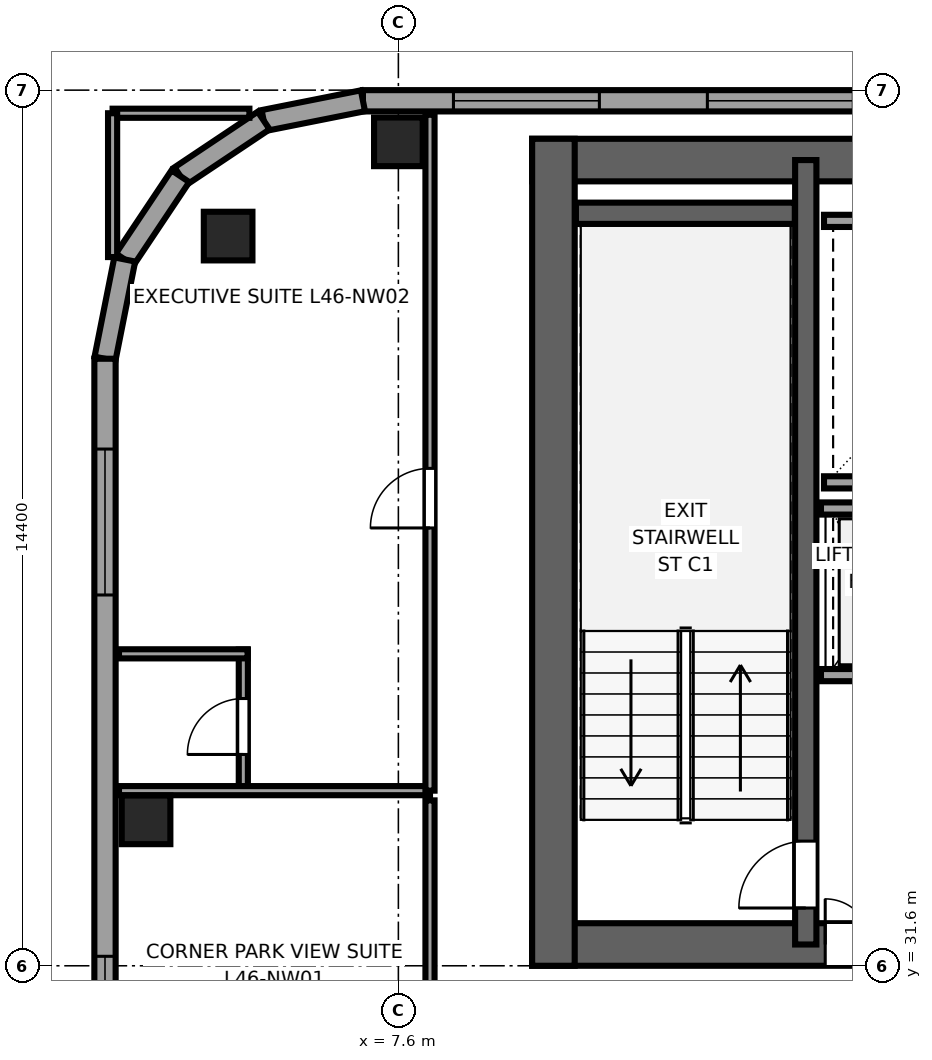
"""IFC4 building model, lengths in metres.
Left out: names, types, materials, properties, quantities, classifications, styles, units other than length and angle.
Written with IfcOpenShell. Run it as: python <this file> out.ifc"""

import sys

from ifc_helpers import new_model, si_unit, direction, frame, frame_2d, origin, origin_2d, place, context, subcontext, project, spatial, rectangle, extrude, source, transform, mapped, element, fill, save


model = new_model("IFC4")
c1 = context("Model", 3, precision=1e-05, world=origin(), true_north=direction((0.0, 1.0)))
c2 = subcontext(c1, "Body", "Model", "MODEL_VIEW")
j1 = project(units=[si_unit("LENGTHUNIT", "METRE"), si_unit("PLANEANGLEUNIT", "RADIAN")], contexts=[c1])
p1 = place(None, origin())
s1 = spatial("IfcSite", under=j1, at=p1, CompositionType="ELEMENT")
p2 = place(p1, origin())
s2 = spatial("IfcBuilding", under=s1, at=p2, CompositionType="ELEMENT")
p3 = place(p2, frame((0.0, 0.0, 175.45)))
s3 = spatial("IfcBuildingStorey", under=s2, at=p3, CompositionType="ELEMENT", Elevation=175.45)
p4 = place(p3, frame((9.8, 31.95, 0.0), z_axis=(0.0, 0.0, 1.0), x_axis=(1.0, 0.0, 0.0)))
e1 = element("IfcWall", 1, at=p4, inside=s3, PredefinedType="SHEAR", context=c2, shape_type="SweptSolid", body=[
    extrude(rectangle(XDim=26.4, YDim=0.7, at=frame_2d((13.2, 0.0))), origin(), (0.0, 0.0, 1.0), 3.55),
])
p5 = place(p4, frame((6.32, 0.0, 0.0), z_axis=(0.0, 0.0, 1.0), x_axis=(-1.0, 0.0, 0.0)))
e2 = element("IfcOpeningElement", 2, at=p5, cuts=e1, PredefinedType="OPENING", context=c2, shape_type="SweptSolid", body=[
    extrude(rectangle(XDim=1.5, YDim=2.04, at=frame_2d((0.75, 1.02))), frame((0.0, 0.36, 0.0), z_axis=(0.0, -1.0, 0.0), x_axis=(1.0, 0.0, 0.0)), (0.0, 0.0, 1.0), 0.72),
])
p6 = place(p4, frame((13.95, 0.0, 0.0), z_axis=(0.0, 0.0, 1.0), x_axis=(-1.0, 0.0, 0.0)))
e3 = element("IfcOpeningElement", 3, at=p6, cuts=e1, PredefinedType="OPENING", context=c2, shape_type="SweptSolid", body=[
    extrude(rectangle(XDim=1.5, YDim=2.04, at=frame_2d((0.75, 1.02))), frame((0.0, 0.36, 0.0), z_axis=(0.0, -1.0, 0.0), x_axis=(1.0, 0.0, 0.0)), (0.0, 0.0, 1.0), 0.72),
])
p7 = place(p4, frame((20.25, 0.0, 0.0), z_axis=(0.0, 0.0, 1.0), x_axis=(-1.0, 0.0, 0.0)))
e4 = element("IfcOpeningElement", 4, at=p7, cuts=e1, PredefinedType="OPENING", context=c2, shape_type="SweptSolid", body=[
    extrude(rectangle(XDim=1.5, YDim=2.04, at=frame_2d((0.75, 1.02))), frame((0.0, 0.36, 0.0), z_axis=(0.0, -1.0, 0.0), x_axis=(1.0, 0.0, 0.0)), (0.0, 0.0, 1.0), 0.72),
])
p8 = place(p4, frame((8.37, 0.0, 0.0), z_axis=(0.0, 0.0, 1.0), x_axis=(-1.0, 0.0, 0.0)))
e5 = element("IfcOpeningElement", 5, at=p8, cuts=e1, PredefinedType="OPENING", context=c2, shape_type="SweptSolid", body=[
    extrude(rectangle(XDim=0.82, YDim=2.01, at=frame_2d((0.41, 1.005))), frame((0.0, 0.36, 0.0), z_axis=(0.0, -1.0, 0.0), x_axis=(1.0, 0.0, 0.0)), (0.0, 0.0, 1.0), 0.72),
])
p9 = place(p3, frame((9.8, 44.85, 0.0), z_axis=(0.0, 0.0, 1.0), x_axis=(1.0, 0.0, 0.0)))
e6 = element("IfcWall", 6, at=p9, inside=s3, PredefinedType="SHEAR", context=c2, shape_type="SweptSolid", body=[
    extrude(rectangle(XDim=26.4, YDim=0.7, at=frame_2d((13.2, 0.0))), origin(), (0.0, 0.0, 1.0), 3.55),
])
p10 = place(p3, frame((10.15, 31.6, 0.0), z_axis=(0.0, 0.0, 1.0), x_axis=(0.0, 1.0, 0.0)))
e7 = element("IfcWall", 7, at=p10, inside=s3, PredefinedType="SHEAR", context=c2, shape_type="SweptSolid", body=[
    extrude(rectangle(XDim=13.6, YDim=0.7, at=frame_2d((6.8, 0.0))), origin(), (0.0, 0.0, 1.0), 3.55),
])
p11 = place(p3, frame((14.3, 31.95, 0.0), z_axis=(0.0, 0.0, 1.0), x_axis=(0.0, 1.0, 0.0)))
e8 = element("IfcWall", 8, at=p11, inside=s3, PredefinedType="SHEAR", context=c2, shape_type="SweptSolid", body=[
    extrude(rectangle(XDim=12.9, YDim=0.35, at=frame_2d((6.45, 0.0))), origin(), (0.0, 0.0, 1.0), 3.55),
])
p12 = place(p11, frame((0.6, 0.0, 0.0)))
e9 = element("IfcOpeningElement", 9, at=p12, cuts=e8, PredefinedType="OPENING", context=c2, shape_type="SweptSolid", body=[
    extrude(rectangle(XDim=1.1, YDim=2.12, at=frame_2d((0.55, 1.06))), frame((0.0, 0.185, 0.0), z_axis=(0.0, -1.0, 0.0), x_axis=(1.0, 0.0, 0.0)), (0.0, 0.0, 1.0), 0.37),
])
p13 = place(p3, frame((10.52, 43.975, 0.0), z_axis=(0.0, 0.0, 1.0), x_axis=(1.0, 0.0, 0.0)))
e10 = element("IfcWall", 10, at=p13, inside=s3, PredefinedType="SHEAR", context=c2, shape_type="SweptSolid", body=[
    extrude(rectangle(XDim=3.6, YDim=0.35, at=frame_2d((1.8, 0.0))), origin(), (0.0, 0.0, 1.0), 3.55),
])
m1 = source(origin(), c2, "Body", "SweptSolid", [
    extrude(rectangle(XDim=0.8, YDim=0.8, at=origin_2d()), origin(), (0.0, 0.0, 1.0), 3.55),
])
for number, where, z_axis, x_axis in (
    (11, (4.8, 43.6, 0.0), (0.0, 0.0, 1.0), (1.0, 0.0, 0.0)),
    (12, (7.6, 45.15, 0.0), (0.0, 0.0, 1.0), (1.0, 0.0, 0.0)),
    (13, (3.45, 34.0, 0.0), (0.0, 0.0, 1.0), (1.0, 0.0, 0.0)),
):
    element("IfcColumn", number, at=place(p3, frame(where, z_axis=z_axis, x_axis=x_axis)), inside=s3, PredefinedType="COLUMN", context=c2, shape_type="MappedRepresentation", body=[
        mapped(m1, transform((0.0, 0.0, 0.0), x_axis=(1.0, 0.0, 0.0), y_axis=(0.0, 1.0, 0.0), z_axis=(0.0, 0.0, 1.0), scale=1.0)),
    ])
p14 = place(p3, frame((49.983, 45.825, 0.0), z_axis=(0.0, 0.0, 1.0), x_axis=(-1.0, 0.0, 0.0)))
e14 = element("IfcWall", 14, at=p14, inside=s3, PredefinedType="SOLIDWALL", context=c2, shape_type="SweptSolid", body=[
    extrude(rectangle(XDim=42.966, YDim=0.35, at=frame_2d((21.483, 0.0))), origin(), (0.0, 0.0, 1.0), 3.37),
])
p15 = place(p14, frame((1.488, 0.0, 0.68)))
e15 = element("IfcOpeningElement", 15, at=p15, cuts=e14, PredefinedType="OPENING", context=c2, shape_type="SweptSolid", body=[
    extrude(rectangle(XDim=2.4, YDim=1.9, at=frame_2d((1.2, 0.95))), frame((0.0, 0.185, 0.0), z_axis=(0.0, -1.0, 0.0), x_axis=(1.0, 0.0, 0.0)), (0.0, 0.0, 1.0), 0.37),
])
p16 = place(p14, frame((9.841, 0.0, 0.68)))
e16 = element("IfcOpeningElement", 16, at=p16, cuts=e14, PredefinedType="OPENING", context=c2, shape_type="SweptSolid", body=[
    extrude(rectangle(XDim=2.4, YDim=1.9, at=frame_2d((1.2, 0.95))), frame((0.0, 0.185, 0.0), z_axis=(0.0, -1.0, 0.0), x_axis=(1.0, 0.0, 0.0)), (0.0, 0.0, 1.0), 0.37),
])
p17 = place(p14, frame((14.018, 0.0, 0.68)))
e17 = element("IfcOpeningElement", 17, at=p17, cuts=e14, PredefinedType="OPENING", context=c2, shape_type="SweptSolid", body=[
    extrude(rectangle(XDim=2.4, YDim=1.9, at=frame_2d((1.2, 0.95))), frame((0.0, 0.185, 0.0), z_axis=(0.0, -1.0, 0.0), x_axis=(1.0, 0.0, 0.0)), (0.0, 0.0, 1.0), 0.37),
])
p18 = place(p14, frame((18.195, 0.0, 0.68)))
e18 = element("IfcOpeningElement", 18, at=p18, cuts=e14, PredefinedType="OPENING", context=c2, shape_type="SweptSolid", body=[
    extrude(rectangle(XDim=2.4, YDim=1.9, at=frame_2d((1.2, 0.95))), frame((0.0, 0.185, 0.0), z_axis=(0.0, -1.0, 0.0), x_axis=(1.0, 0.0, 0.0)), (0.0, 0.0, 1.0), 0.37),
])
p19 = place(p14, frame((22.371, 0.0, 0.68)))
e19 = element("IfcOpeningElement", 19, at=p19, cuts=e14, PredefinedType="OPENING", context=c2, shape_type="SweptSolid", body=[
    extrude(rectangle(XDim=2.4, YDim=1.9, at=frame_2d((1.2, 0.95))), frame((0.0, 0.185, 0.0), z_axis=(0.0, -1.0, 0.0), x_axis=(1.0, 0.0, 0.0)), (0.0, 0.0, 1.0), 0.37),
])
p20 = place(p14, frame((26.548, 0.0, 0.68)))
e20 = element("IfcOpeningElement", 20, at=p20, cuts=e14, PredefinedType="OPENING", context=c2, shape_type="SweptSolid", body=[
    extrude(rectangle(XDim=2.4, YDim=1.9, at=frame_2d((1.2, 0.95))), frame((0.0, 0.185, 0.0), z_axis=(0.0, -1.0, 0.0), x_axis=(1.0, 0.0, 0.0)), (0.0, 0.0, 1.0), 0.37),
])
p21 = place(p14, frame((30.724, 0.0, 0.68)))
e21 = element("IfcOpeningElement", 21, at=p21, cuts=e14, PredefinedType="OPENING", context=c2, shape_type="SweptSolid", body=[
    extrude(rectangle(XDim=2.4, YDim=1.9, at=frame_2d((1.2, 0.95))), frame((0.0, 0.185, 0.0), z_axis=(0.0, -1.0, 0.0), x_axis=(1.0, 0.0, 0.0)), (0.0, 0.0, 1.0), 0.37),
])
p22 = place(p14, frame((34.901, 0.0, 0.68)))
e22 = element("IfcOpeningElement", 22, at=p22, cuts=e14, PredefinedType="OPENING", context=c2, shape_type="SweptSolid", body=[
    extrude(rectangle(XDim=2.4, YDim=1.9, at=frame_2d((1.2, 0.95))), frame((0.0, 0.185, 0.0), z_axis=(0.0, -1.0, 0.0), x_axis=(1.0, 0.0, 0.0)), (0.0, 0.0, 1.0), 0.37),
])
p23 = place(p14, frame((39.077, 0.0, 0.68)))
e23 = element("IfcOpeningElement", 23, at=p23, cuts=e14, PredefinedType="OPENING", context=c2, shape_type="SweptSolid", body=[
    extrude(rectangle(XDim=2.4, YDim=1.9, at=frame_2d((1.2, 0.95))), frame((0.0, 0.185, 0.0), z_axis=(0.0, -1.0, 0.0), x_axis=(1.0, 0.0, 0.0)), (0.0, 0.0, 1.0), 0.37),
])
p24 = place(p3, frame((7.017, 45.825, 0.0), z_axis=(0.0, 0.0, 1.0), x_axis=(-0.980788844421, -0.195072403631, 0.0)))
e24 = element("IfcWall", 24, at=p24, inside=s3, PredefinedType="SOLIDWALL", context=c2, shape_type="SweptSolid", body=[
    extrude(rectangle(XDim=1.665, YDim=0.35, at=frame_2d((0.832, 0.0))), origin(), (0.0, 0.0, 1.0), 3.37),
])
for number, where, z_axis, x_axis in (
    (25, (5.385, 45.5, 0.0), (0.0, 0.0, 1.0), (-0.832, -0.556, 0.0)),
    (26, (4.015, 44.585, 0.0), (0.0, 0.0, 1.0), (-0.556, -0.831, 0.0)),
):
    element("IfcWall", number, at=place(p3, frame(where, z_axis=z_axis, x_axis=x_axis)), inside=s3, PredefinedType="SOLIDWALL", context=c2, shape_type="SweptSolid", body=[
        extrude(rectangle(XDim=1.647, YDim=0.35, at=frame_2d((0.824, 0.0))), origin(), (0.0, 0.0, 1.0), 2.832),
    ])
p25 = place(p3, frame((3.1, 43.216, 0.0), z_axis=(0.0, 0.0, 1.0), x_axis=(-0.195044345786, -0.980794424524, 0.0)))
e27 = element("IfcWall", 27, at=p25, inside=s3, PredefinedType="SOLIDWALL", context=c2, shape_type="SweptSolid", body=[
    extrude(rectangle(XDim=1.665, YDim=0.35, at=frame_2d((0.833, 0.0))), origin(), (0.0, 0.0, 1.0), 3.37),
])
p26 = place(p3, frame((2.775, 41.583, 0.0), z_axis=(0.0, 0.0, 1.0), x_axis=(0.0, -1.0, 0.0)))
e28 = element("IfcWall", 28, at=p26, inside=s3, PredefinedType="SOLIDWALL", context=c2, shape_type="SweptSolid", body=[
    extrude(rectangle(XDim=34.566, YDim=0.35, at=frame_2d((17.283, 0.0))), origin(), (0.0, 0.0, 1.0), 3.37),
])
p27 = place(p26, frame((1.485, 0.0, 0.68)))
e29 = element("IfcOpeningElement", 29, at=p27, cuts=e28, PredefinedType="OPENING", context=c2, shape_type="SweptSolid", body=[
    extrude(rectangle(XDim=2.4, YDim=1.9, at=frame_2d((1.2, 0.95))), frame((0.0, 0.185, 0.0), z_axis=(0.0, -1.0, 0.0), x_axis=(1.0, 0.0, 0.0)), (0.0, 0.0, 1.0), 0.37),
])
p28 = place(p26, frame((9.827, 0.0, 0.68)))
e30 = element("IfcOpeningElement", 30, at=p28, cuts=e28, PredefinedType="OPENING", context=c2, shape_type="SweptSolid", body=[
    extrude(rectangle(XDim=2.4, YDim=1.9, at=frame_2d((1.2, 0.95))), frame((0.0, 0.185, 0.0), z_axis=(0.0, -1.0, 0.0), x_axis=(1.0, 0.0, 0.0)), (0.0, 0.0, 1.0), 0.37),
])
p29 = place(p26, frame((13.997, 0.0, 0.68)))
e31 = element("IfcOpeningElement", 31, at=p29, cuts=e28, PredefinedType="OPENING", context=c2, shape_type="SweptSolid", body=[
    extrude(rectangle(XDim=2.4, YDim=1.9, at=frame_2d((1.2, 0.95))), frame((0.0, 0.185, 0.0), z_axis=(0.0, -1.0, 0.0), x_axis=(1.0, 0.0, 0.0)), (0.0, 0.0, 1.0), 0.37),
])
p30 = place(p26, frame((30.13, 0.0, 0.68)))
e32 = element("IfcOpeningElement", 32, at=p30, cuts=e28, PredefinedType="OPENING", context=c2, shape_type="SweptSolid", body=[
    extrude(rectangle(XDim=2.4, YDim=1.9, at=frame_2d((1.2, 0.95))), frame((0.0, 0.185, 0.0), z_axis=(0.0, -1.0, 0.0), x_axis=(1.0, 0.0, 0.0)), (0.0, 0.0, 1.0), 0.37),
])
p31 = place(p26, frame((24.983, 0.0, 0.62)))
e33 = element("IfcOpeningElement", 33, at=p31, cuts=e28, PredefinedType="OPENING", context=c2, shape_type="SweptSolid", body=[
    extrude(rectangle(XDim=1.5, YDim=1.55, at=frame_2d((0.75, 0.775))), frame((0.0, 0.185, 0.0), z_axis=(0.0, -1.0, 0.0), x_axis=(1.0, 0.0, 0.0)), (0.0, 0.0, 1.0), 0.37),
])
for number, where, z_axis, x_axis in (
    (34, (14.6, 39.55, 0.0), (0.0, 0.0, 1.0), (1.0, 0.0, 0.0)),
    (35, (14.6, 43.85, 0.0), (0.0, 0.0, 1.0), (1.0, 0.0, 0.0)),
):
    element("IfcWall", number, at=place(p3, frame(where, z_axis=z_axis, x_axis=x_axis)), inside=s3, PredefinedType="SOLIDWALL", context=c2, shape_type="SweptSolid", body=[
        extrude(rectangle(XDim=4.1, YDim=0.2, at=frame_2d((2.05, 0.0))), origin(), (0.0, 0.0, 1.0), 3.37),
    ])
p32 = place(p3, frame((14.55, 36.38, 0.0), z_axis=(0.0, 0.0, 1.0), x_axis=(1.0, 0.0, 0.0)))
e36 = element("IfcWall", 36, at=p32, inside=s3, PredefinedType="SOLIDWALL", context=c2, shape_type="SweptSolid", body=[
    extrude(rectangle(XDim=4.075, YDim=0.2, at=frame_2d((2.038, 0.0))), origin(), (0.0, 0.0, 1.0), 3.37),
])
p33 = place(p32, frame((0.55, 0.0, 0.0)))
e37 = element("IfcOpeningElement", 37, at=p33, cuts=e36, PredefinedType="OPENING", context=c2, shape_type="SweptSolid", body=[
    extrude(rectangle(XDim=1.1, YDim=2.12, at=frame_2d((0.55, 1.06))), frame((0.0, 0.11, 0.0), z_axis=(0.0, -1.0, 0.0), x_axis=(1.0, 0.0, 0.0)), (0.0, 0.0, 1.0), 0.22),
])
p34 = place(p32, frame((2.45, 0.0, 0.0)))
e38 = element("IfcOpeningElement", 38, at=p34, cuts=e36, PredefinedType="OPENING", context=c2, shape_type="SweptSolid", body=[
    extrude(rectangle(XDim=1.1, YDim=2.12, at=frame_2d((0.55, 1.06))), frame((0.0, 0.11, 0.0), z_axis=(0.0, -1.0, 0.0), x_axis=(1.0, 0.0, 0.0)), (0.0, 0.0, 1.0), 0.22),
])
p35 = place(p3, frame((14.55, 39.12, 0.0), z_axis=(0.0, 0.0, 1.0), x_axis=(1.0, 0.0, 0.0)))
e39 = element("IfcWall", 39, at=p35, inside=s3, PredefinedType="SOLIDWALL", context=c2, shape_type="SweptSolid", body=[
    extrude(rectangle(XDim=4.075, YDim=0.2, at=frame_2d((2.038, 0.0))), origin(), (0.0, 0.0, 1.0), 3.37),
])
p36 = place(p3, frame((5.05, 34.41, 0.0), z_axis=(0.0, 0.0, 1.0), x_axis=(0.0, 1.0, 0.0)))
e40 = element("IfcWall", 40, at=p36, inside=s3, PredefinedType="PARTITIONING", context=c2, shape_type="SweptSolid", body=[
    extrude(rectangle(XDim=2.39, YDim=0.15, at=frame_2d((1.195, 0.0))), origin(), (0.0, 0.0, 1.0), 3.37),
])
p37 = place(p36, frame((0.665, 0.0, 0.0)))
e41 = element("IfcOpeningElement", 41, at=p37, cuts=e40, PredefinedType="OPENING", context=c2, shape_type="SweptSolid", body=[
    extrude(rectangle(XDim=0.92, YDim=2.01, at=frame_2d((0.46, 1.005))), frame((0.0, 0.085, 0.0), z_axis=(0.0, -1.0, 0.0), x_axis=(1.0, 0.0, 0.0)), (0.0, 0.0, 1.0), 0.17),
])
p38 = place(p3, frame((3.005, 34.48, 0.0), z_axis=(0.0, 0.0, 1.0), x_axis=(1.0, 0.0, 0.0)))
e42 = element("IfcWall", 42, at=p38, inside=s3, PredefinedType="PARTITIONING", context=c2, shape_type="SweptSolid", body=[
    extrude(rectangle(XDim=5.115, YDim=0.15, at=frame_2d((2.558, 0.0))), origin(), (0.0, 0.0, 1.0), 3.37),
])
p39 = place(p3, frame((3.005, 36.73, 0.0), z_axis=(0.0, 0.0, 1.0), x_axis=(1.0, 0.0, 0.0)))
e43 = element("IfcWall", 43, at=p39, inside=s3, PredefinedType="PARTITIONING", context=c2, shape_type="SweptSolid", body=[
    extrude(rectangle(XDim=2.115, YDim=0.15, at=frame_2d((1.058, 0.0))), origin(), (0.0, 0.0, 1.0), 3.37),
])
p40 = place(p3, frame((8.12, 20.78, 0.0), z_axis=(0.0, 0.0, 1.0), x_axis=(0.0, 1.0, 0.0)))
e44 = element("IfcWall", 44, at=p40, inside=s3, PredefinedType="PARTITIONING", context=c2, shape_type="SweptSolid", body=[
    extrude(rectangle(XDim=13.54, YDim=0.15, at=frame_2d((6.77, 0.0))), origin(), (0.0, 0.0, 1.0), 3.37),
])
p41 = place(p40, frame((6.28, 0.0, 0.0)))
e45 = element("IfcOpeningElement", 45, at=p41, cuts=e44, PredefinedType="OPENING", context=c2, shape_type="SweptSolid", body=[
    extrude(rectangle(XDim=0.98, YDim=2.12, at=frame_2d((0.49, 1.06))), frame((0.0, 0.085, 0.0), z_axis=(0.0, -1.0, 0.0), x_axis=(1.0, 0.0, 0.0)), (0.0, 0.0, 1.0), 0.17),
])
p42 = place(p3, frame((8.12, 34.48, 0.0), z_axis=(0.0, 0.0, 1.0), x_axis=(0.0, 1.0, 0.0)))
e46 = element("IfcWall", 46, at=p42, inside=s3, PredefinedType="PARTITIONING", context=c2, shape_type="SweptSolid", body=[
    extrude(rectangle(XDim=11.115, YDim=0.15, at=frame_2d((5.558, 0.0))), origin(), (0.0, 0.0, 1.0), 3.37),
])
p43 = place(p42, frame((4.32, 0.0, 0.0)))
e47 = element("IfcOpeningElement", 47, at=p43, cuts=e46, PredefinedType="OPENING", context=c2, shape_type="SweptSolid", body=[
    extrude(rectangle(XDim=0.98, YDim=2.12, at=frame_2d((0.49, 1.06))), frame((0.0, 0.085, 0.0), z_axis=(0.0, -1.0, 0.0), x_axis=(1.0, 0.0, 0.0)), (0.0, 0.0, 1.0), 0.17),
])
p44 = place(p3, frame((2.9, 45.62, 0.0), z_axis=(0.0, 0.0, 1.0), x_axis=(1.0, 0.0, 0.0)))
e48 = element("IfcWall", 48, at=p44, inside=s3, PredefinedType="PARTITIONING", context=c2, shape_type="SweptSolid", body=[
    extrude(rectangle(XDim=2.25, YDim=0.15, at=frame_2d((1.125, 0.0))), origin(), (0.0, 0.0, 1.0), 3.37),
])
p45 = place(p3, frame((2.9, 43.255, 0.0), z_axis=(0.0, 0.0, 1.0), x_axis=(0.0, 1.0, 0.0)))
e49 = element("IfcWall", 49, at=p45, inside=s3, PredefinedType="PARTITIONING", context=c2, shape_type="SweptSolid", body=[
    extrude(rectangle(XDim=2.365, YDim=0.15, at=frame_2d((1.183, 0.0))), origin(), (0.0, 0.0, 1.0), 3.37),
])
m2 = source(origin(), c2, "Body", "SweptSolid", [
    extrude(rectangle(XDim=2.4, YDim=1.9, at=frame_2d((1.2, 0.95))), frame((0.0, 0.09, 0.0), z_axis=(0.0, -1.0, 0.0), x_axis=(1.0, 0.0, 0.0)), (0.0, 0.0, 1.0), 0.06),
])
p46 = place(p22, origin())
e50 = element("IfcWindow", 50, at=p46, inside=s3, PartitioningType="TRIPLE_PANEL_HORIZONTAL", PredefinedType="WINDOW", context=c2, shape_type="MappedRepresentation", body=[
    mapped(m2, transform((0.0, 0.0, 0.0), x_axis=(1.0, 0.0, 0.0), y_axis=(0.0, 1.0, 0.0), z_axis=(0.0, 0.0, 1.0), scale=1.0)),
])
fill(e22, e50)
p47 = place(p23, origin())
e51 = element("IfcWindow", 51, at=p47, inside=s3, PartitioningType="TRIPLE_PANEL_HORIZONTAL", PredefinedType="WINDOW", context=c2, shape_type="MappedRepresentation", body=[
    mapped(m2, transform((0.0, 0.0, 0.0), x_axis=(1.0, 0.0, 0.0), y_axis=(0.0, 1.0, 0.0), z_axis=(0.0, 0.0, 1.0), scale=1.0)),
])
fill(e23, e51)
p48 = place(p27, origin())
e52 = element("IfcWindow", 52, at=p48, inside=s3, PartitioningType="TRIPLE_PANEL_HORIZONTAL", PredefinedType="WINDOW", context=c2, shape_type="MappedRepresentation", body=[
    mapped(m2, transform((0.0, 0.0, 0.0), x_axis=(1.0, 0.0, 0.0), y_axis=(0.0, 1.0, 0.0), z_axis=(0.0, 0.0, 1.0), scale=1.0)),
])
fill(e29, e52)
p49 = place(p28, origin())
e53 = element("IfcWindow", 53, at=p49, inside=s3, PartitioningType="TRIPLE_PANEL_HORIZONTAL", PredefinedType="WINDOW", context=c2, shape_type="MappedRepresentation", body=[
    mapped(m2, transform((0.0, 0.0, 0.0), x_axis=(1.0, 0.0, 0.0), y_axis=(0.0, 1.0, 0.0), z_axis=(0.0, 0.0, 1.0), scale=1.0)),
])
fill(e30, e53)
m3 = source(origin(), c2, "Body", "SweptSolid", [
    extrude(rectangle(XDim=1.1, YDim=2.12, at=frame_2d((0.55, 1.06))), frame((0.0, 0.025, 0.0), z_axis=(0.0, -1.0, 0.0), x_axis=(1.0, 0.0, 0.0)), (0.0, 0.0, 1.0), 0.05),
])
p50 = place(p12, origin())
e54 = element("IfcDoor", 54, at=p50, inside=s3, OperationType="SINGLE_SWING_LEFT", PredefinedType="DOOR", context=c2, shape_type="MappedRepresentation", body=[
    mapped(m3, transform((0.0, 0.0, 0.0), x_axis=(1.0, 0.0, 0.0), y_axis=(0.0, 1.0, 0.0), z_axis=(0.0, 0.0, 1.0), scale=1.0)),
])
fill(e9, e54)
m4 = source(origin(), c2, "Body", "SweptSolid", [
    extrude(rectangle(XDim=1.5, YDim=2.04, at=frame_2d((0.75, 1.02))), frame((0.0, 0.025, 0.0), z_axis=(0.0, -1.0, 0.0), x_axis=(1.0, 0.0, 0.0)), (0.0, 0.0, 1.0), 0.05),
])
p51 = place(p5, origin())
e55 = element("IfcDoor", 55, at=p51, inside=s3, OperationType="DOUBLE_DOOR_SINGLE_SWING", PredefinedType="DOOR", context=c2, shape_type="MappedRepresentation", body=[
    mapped(m4, transform((0.0, 0.0, 0.0), x_axis=(1.0, 0.0, 0.0), y_axis=(0.0, 1.0, 0.0), z_axis=(0.0, 0.0, 1.0), scale=1.0)),
])
fill(e2, e55)
m5 = source(origin(), c2, "Body", "SweptSolid", [
    extrude(rectangle(XDim=0.92, YDim=2.01, at=frame_2d((0.46, 1.005))), frame((0.0, 0.025, 0.0), z_axis=(0.0, -1.0, 0.0), x_axis=(1.0, 0.0, 0.0)), (0.0, 0.0, 1.0), 0.05),
])
p52 = place(p37, origin())
e56 = element("IfcDoor", 56, at=p52, inside=s3, OperationType="SINGLE_SWING_LEFT", PredefinedType="DOOR", context=c2, shape_type="MappedRepresentation", body=[
    mapped(m5, transform((0.0, 0.0, 0.0), x_axis=(1.0, 0.0, 0.0), y_axis=(0.0, 1.0, 0.0), z_axis=(0.0, 0.0, 1.0), scale=1.0)),
])
fill(e41, e56)
m6 = source(origin(), c2, "Body", "SweptSolid", [
    extrude(rectangle(XDim=0.98, YDim=2.12, at=frame_2d((0.49, 1.06))), frame((0.0, 0.025, 0.0), z_axis=(0.0, -1.0, 0.0), x_axis=(1.0, 0.0, 0.0)), (0.0, 0.0, 1.0), 0.05),
])
p53 = place(p43, origin())
e57 = element("IfcDoor", 57, at=p53, inside=s3, OperationType="SINGLE_SWING_LEFT", PredefinedType="DOOR", context=c2, shape_type="MappedRepresentation", body=[
    mapped(m6, transform((0.0, 0.0, 0.0), x_axis=(1.0, 0.0, 0.0), y_axis=(0.0, 1.0, 0.0), z_axis=(0.0, 0.0, 1.0), scale=1.0)),
])
fill(e47, e57)
save(model, sys.argv[1])
